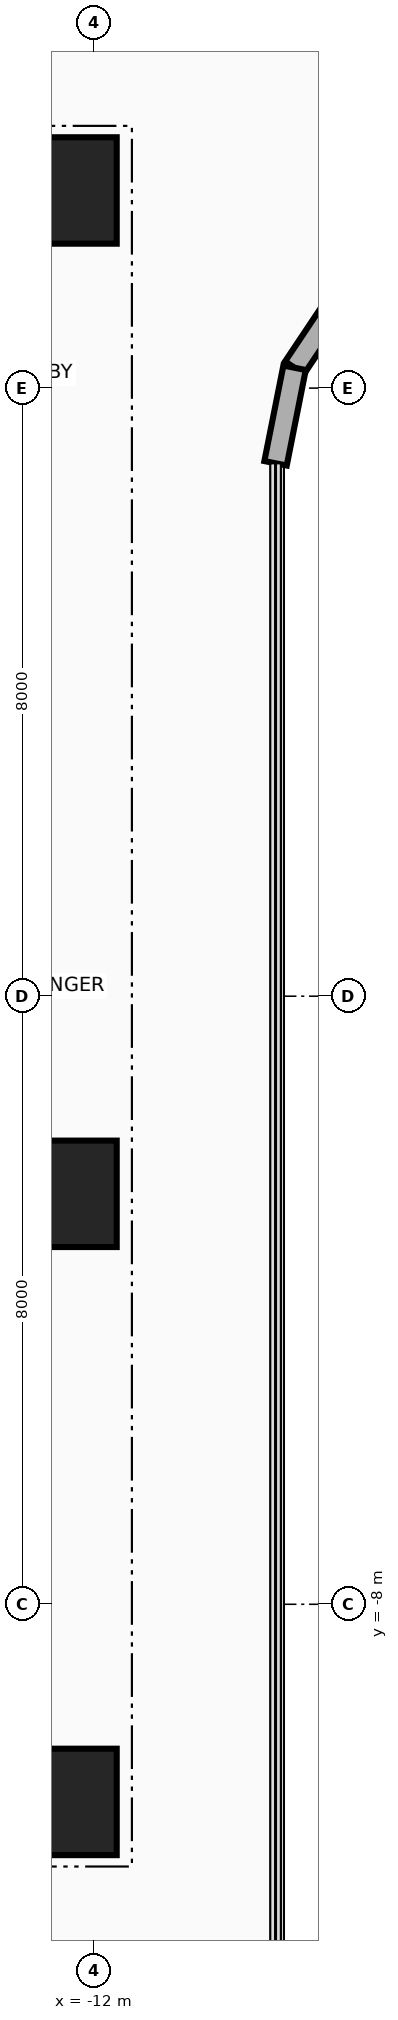
"""IFC4 building model, lengths in metres.
Left out: names, types, materials, properties, quantities, classifications, styles, units other than length and angle.
Written with IfcOpenShell. Run it as: python <this file> out.ifc"""

import sys

from ifc_helpers import new_model, si_unit, direction, frame, frame_2d, origin, origin_2d, place, context, subcontext, project, spatial, rectangle, extrude, source, transform, mapped, element, save


model = new_model("IFC4")
c1 = context("Model", 3, precision=1e-05, world=origin(), true_north=direction((0.0, 1.0)))
c2 = subcontext(c1, "Body", "Model", "MODEL_VIEW")
j1 = project(units=[si_unit("LENGTHUNIT", "METRE"), si_unit("PLANEANGLEUNIT", "RADIAN")], contexts=[c1])
p1 = place(None, origin())
s1 = spatial("IfcSite", under=j1, at=p1, CompositionType="ELEMENT")
p2 = place(p1, origin())
s2 = spatial("IfcBuilding", under=s1, at=p2, CompositionType="ELEMENT")
p3 = place(p2, frame((0.0, 0.0, 55.6)))
s3 = spatial("IfcBuildingStorey", under=s2, at=p3, CompositionType="ELEMENT", Elevation=55.6)
for number, where, z_axis, x_axis in (
    (1, (-22.65, 10.8, 0.0), (0.0, 0.0, 1.0), (1.0, 0.0, 0.0)),
    (2, (-22.65, -10.8, 0.0), (0.0, 0.0, 1.0), (1.0, 0.0, 0.0)),
):
    element("IfcWall", number, at=place(p3, frame(where, z_axis=z_axis, x_axis=x_axis)), inside=s3, PredefinedType="SHEAR", context=c2, shape_type="SweptSolid", body=[
        extrude(rectangle(XDim=10.25, YDim=0.7, at=frame_2d((5.125, 0.0))), origin(), (0.0, 0.0, 1.0), 3.46),
    ])
m1 = source(origin(), c2, "Body", "SweptSolid", [
    extrude(rectangle(XDim=1.4, YDim=1.4, at=origin_2d()), origin(), (0.0, 0.0, 1.0), 3.7),
])
for number, where, z_axis, x_axis in (
    (3, (-12.4, -10.6, 0.0), (0.0, 0.0, 1.0), (1.0, 0.0, 0.0)),
    (4, (-12.4, -2.6, 0.0), (0.0, 0.0, 1.0), (1.0, 0.0, 0.0)),
    (5, (-12.4, 10.6, 0.0), (0.0, 0.0, 1.0), (1.0, 0.0, 0.0)),
):
    element("IfcColumn", number, at=place(p3, frame(where, z_axis=z_axis, x_axis=x_axis)), inside=s3, PredefinedType="COLUMN", context=c2, shape_type="MappedRepresentation", body=[
        mapped(m1, transform((0.0, 0.0, 0.0), x_axis=(1.0, 0.0, 0.0), y_axis=(0.0, 1.0, 0.0), z_axis=(0.0, 0.0, 1.0), scale=1.0)),
    ])
p4 = place(p3, frame((-8.642, 9.342, 0.0), z_axis=(0.0, 0.0, 1.0), x_axis=(-0.555615398575, -0.831439431869, 0.0)))
e6 = element("IfcWall", 6, at=p4, inside=s3, PredefinedType="SOLIDWALL", context=c2, shape_type="SweptSolid", body=[
    extrude(rectangle(XDim=1.292, YDim=0.3, at=frame_2d((0.646, 0.0))), origin(), (0.0, 0.0, 1.0), 3.46),
])
p5 = place(p3, frame((-9.36, 8.268, 0.0), z_axis=(0.0, 0.0, 1.0), x_axis=(-0.195090163074, -0.980785312019, 0.0)))
e7 = element("IfcWall", 7, at=p5, inside=s3, PredefinedType="SOLIDWALL", context=c2, shape_type="SweptSolid", body=[
    extrude(rectangle(XDim=1.281, YDim=0.3, at=frame_2d((0.641, 0.0))), origin(), (0.0, 0.0, 1.0), 3.46),
])
save(model, sys.argv[1])
